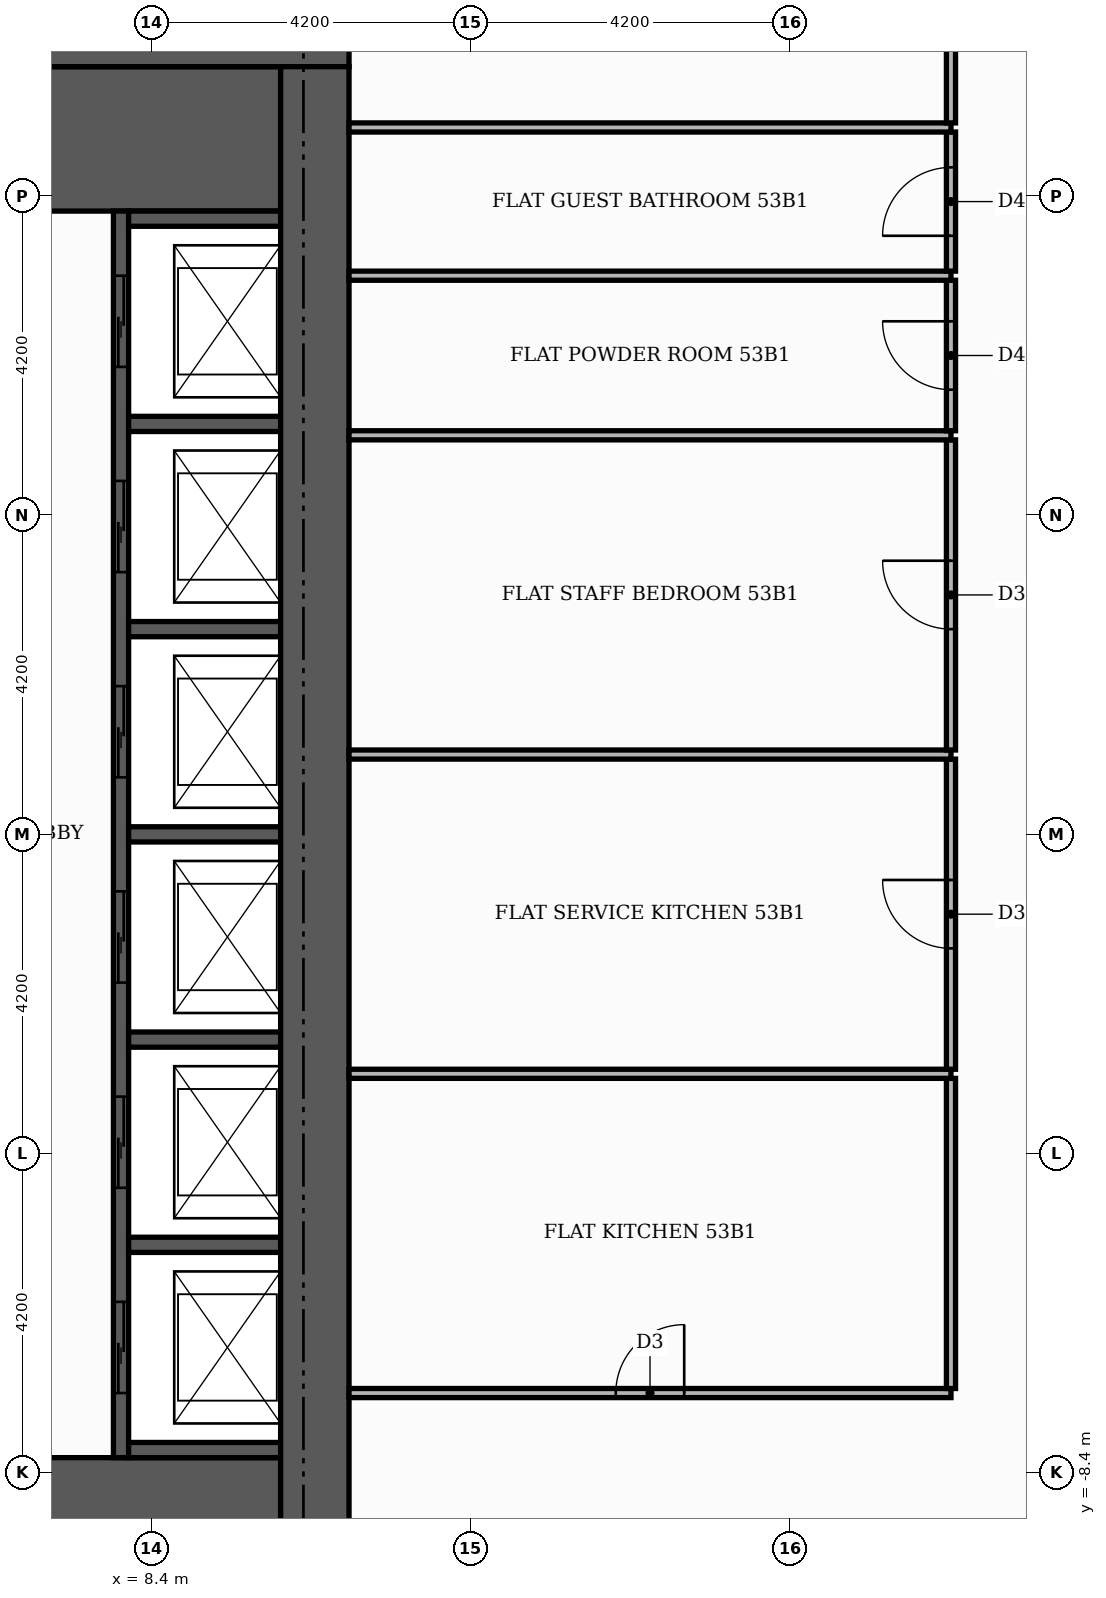
"""IFC4 building model, lengths in metres.
Left out: names, types, materials, properties, quantities, classifications, styles, units other than length and angle.
Written with IfcOpenShell. Run it as: python <this file> out.ifc"""

import sys

from ifc_helpers import new_model, si_unit, direction, frame, frame_2d, origin, place, context, subcontext, project, spatial, rectangle, extrude, element, fill, save


model = new_model("IFC4")
c1 = context("Model", 3, precision=1e-05, world=origin(), true_north=direction((0.0, 1.0)))
c2 = subcontext(c1, "Body", "Model", "MODEL_VIEW")
j1 = project(units=[si_unit("LENGTHUNIT", "METRE"), si_unit("PLANEANGLEUNIT", "RADIAN")], contexts=[c1])
p1 = place(None, origin())
s1 = spatial("IfcSite", under=j1, at=p1, CompositionType="ELEMENT")
p2 = place(p1, origin())
s2 = spatial("IfcBuilding", under=s1, at=p2, CompositionType="ELEMENT")
p3 = place(p2, frame((0.0, 0.0, 223.5)))
s3 = spatial("IfcBuildingStorey", under=s2, at=p3, CompositionType="ELEMENT", Elevation=223.5)
for number, where, z_axis, x_axis in (
    (1, (5.5, -9.15, 0.0), (0.0, 0.0, 1.0), (1.0, 0.0, 0.0)),
    (2, (5.5, 9.15, 0.0), (0.0, 0.0, 1.0), (1.0, 0.0, 0.0)),
):
    element("IfcWall", number, at=place(p3, frame(where, z_axis=z_axis, x_axis=x_axis)), inside=s3, PredefinedType="SHEAR", context=c2, shape_type="SweptSolid", body=[
        extrude(rectangle(XDim=4.6, YDim=1.9, at=frame_2d((2.3, 0.0))), origin(), (0.0, 0.0, 1.0), 3.48),
    ])
p4 = place(p3, frame((8.0, -8.2, 0.0), z_axis=(0.0, 0.0, 1.0), x_axis=(0.0, 1.0, 0.0)))
e3 = element("IfcWall", 3, at=p4, inside=s3, PredefinedType="SHEAR", context=c2, shape_type="SweptSolid", body=[
    extrude(rectangle(XDim=16.4, YDim=0.2, at=frame_2d((8.2, 0.0))), origin(), (0.0, 0.0, 1.0), 3.48),
])
p5 = place(p4, frame((0.85, 0.0, 0.0)))
e4 = element("IfcOpeningElement", 4, at=p5, cuts=e3, PredefinedType="OPENING", context=c2, shape_type="SweptSolid", body=[
    extrude(rectangle(XDim=1.2, YDim=2.1, at=frame_2d((0.6, 1.05))), frame((0.0, 0.11, 0.0), z_axis=(0.0, -1.0, 0.0), x_axis=(1.0, 0.0, 0.0)), (0.0, 0.0, 1.0), 0.22),
])
p6 = place(p4, frame((3.55, 0.0, 0.0)))
e5 = element("IfcOpeningElement", 5, at=p6, cuts=e3, PredefinedType="OPENING", context=c2, shape_type="SweptSolid", body=[
    extrude(rectangle(XDim=1.2, YDim=2.1, at=frame_2d((0.6, 1.05))), frame((0.0, 0.11, 0.0), z_axis=(0.0, -1.0, 0.0), x_axis=(1.0, 0.0, 0.0)), (0.0, 0.0, 1.0), 0.22),
])
p7 = place(p4, frame((6.25, 0.0, 0.0)))
e6 = element("IfcOpeningElement", 6, at=p7, cuts=e3, PredefinedType="OPENING", context=c2, shape_type="SweptSolid", body=[
    extrude(rectangle(XDim=1.2, YDim=2.1, at=frame_2d((0.6, 1.05))), frame((0.0, 0.11, 0.0), z_axis=(0.0, -1.0, 0.0), x_axis=(1.0, 0.0, 0.0)), (0.0, 0.0, 1.0), 0.22),
])
p8 = place(p4, frame((8.95, 0.0, 0.0)))
e7 = element("IfcOpeningElement", 7, at=p8, cuts=e3, PredefinedType="OPENING", context=c2, shape_type="SweptSolid", body=[
    extrude(rectangle(XDim=1.2, YDim=2.1, at=frame_2d((0.6, 1.05))), frame((0.0, 0.11, 0.0), z_axis=(0.0, -1.0, 0.0), x_axis=(1.0, 0.0, 0.0)), (0.0, 0.0, 1.0), 0.22),
])
p9 = place(p4, frame((11.65, 0.0, 0.0)))
e8 = element("IfcOpeningElement", 8, at=p9, cuts=e3, PredefinedType="OPENING", context=c2, shape_type="SweptSolid", body=[
    extrude(rectangle(XDim=1.2, YDim=2.1, at=frame_2d((0.6, 1.05))), frame((0.0, 0.11, 0.0), z_axis=(0.0, -1.0, 0.0), x_axis=(1.0, 0.0, 0.0)), (0.0, 0.0, 1.0), 0.22),
])
p10 = place(p4, frame((14.35, 0.0, 0.0)))
e9 = element("IfcOpeningElement", 9, at=p10, cuts=e3, PredefinedType="OPENING", context=c2, shape_type="SweptSolid", body=[
    extrude(rectangle(XDim=1.2, YDim=2.1, at=frame_2d((0.6, 1.05))), frame((0.0, 0.11, 0.0), z_axis=(0.0, -1.0, 0.0), x_axis=(1.0, 0.0, 0.0)), (0.0, 0.0, 1.0), 0.22),
])
for number, where, z_axis, x_axis in (
    (10, (8.1, -8.1, 0.0), (0.0, 0.0, 1.0), (1.0, 0.0, 0.0)),
    (11, (8.1, -5.4, 0.0), (0.0, 0.0, 1.0), (1.0, 0.0, 0.0)),
    (12, (8.1, -2.7, 0.0), (0.0, 0.0, 1.0), (1.0, 0.0, 0.0)),
    (13, (8.1, 0.0, 0.0), (0.0, 0.0, 1.0), (1.0, 0.0, 0.0)),
    (14, (8.1, 2.7, 0.0), (0.0, 0.0, 1.0), (1.0, 0.0, 0.0)),
    (15, (8.1, 5.4, 0.0), (0.0, 0.0, 1.0), (1.0, 0.0, 0.0)),
    (16, (8.1, 8.1, 0.0), (0.0, 0.0, 1.0), (1.0, 0.0, 0.0)),
):
    element("IfcWall", number, at=place(p3, frame(where, z_axis=z_axis, x_axis=x_axis)), inside=s3, PredefinedType="SHEAR", context=c2, shape_type="SweptSolid", body=[
        extrude(rectangle(XDim=2.0, YDim=0.2, at=frame_2d((1.0, 0.0))), origin(), (0.0, 0.0, 1.0), 3.48),
    ])
p11 = place(p3, frame((-11.0, 10.55, 0.0), z_axis=(0.0, 0.0, 1.0), x_axis=(1.0, 0.0, 0.0)))
e17 = element("IfcWall", 17, at=p11, inside=s3, PredefinedType="SHEAR", context=c2, shape_type="SweptSolid", body=[
    extrude(rectangle(XDim=22.0, YDim=0.9, at=frame_2d((11.0, 0.0))), origin(), (0.0, 0.0, 1.0), 3.48),
])
p12 = place(p11, frame((13.3, 0.0, 0.0)))
e18 = element("IfcOpeningElement", 18, at=p12, cuts=e17, PredefinedType="OPENING", context=c2, shape_type="SweptSolid", body=[
    extrude(rectangle(XDim=1.8, YDim=2.2, at=frame_2d((0.9, 1.1))), frame((0.0, 0.46, 0.0), z_axis=(0.0, -1.0, 0.0), x_axis=(1.0, 0.0, 0.0)), (0.0, 0.0, 1.0), 0.92),
])
p13 = place(p3, frame((10.55, -10.1, 0.0), z_axis=(0.0, 0.0, 1.0), x_axis=(0.0, 1.0, 0.0)))
e19 = element("IfcWall", 19, at=p13, inside=s3, PredefinedType="SHEAR", context=c2, shape_type="SweptSolid", body=[
    extrude(rectangle(XDim=20.2, YDim=0.9, at=frame_2d((10.1, 0.0))), origin(), (0.0, 0.0, 1.0), 3.48),
])
p14 = place(p3, frame((11.0, -7.35, 0.0), z_axis=(0.0, 0.0, 1.0), x_axis=(1.0, 0.0, 0.0)))
e20 = element("IfcWall", 20, at=p14, inside=s3, PredefinedType="PARTITIONING", context=c2, shape_type="SweptSolid", body=[
    extrude(rectangle(XDim=7.92, YDim=0.12, at=frame_2d((3.96, 0.0))), origin(), (0.0, 0.0, 1.0), 3.48),
])
p15 = place(p14, frame((3.51, 0.0, 0.0)))
e21 = element("IfcOpeningElement", 21, at=p15, cuts=e20, PredefinedType="OPENING", context=c2, shape_type="SweptSolid", body=[
    extrude(rectangle(XDim=0.9, YDim=2.1, at=frame_2d((0.45, 1.05))), frame((0.0, 0.07, 0.0), z_axis=(0.0, -1.0, 0.0), x_axis=(1.0, 0.0, 0.0)), (0.0, 0.0, 1.0), 0.14),
])
p16 = place(p3, frame((18.92, -7.29, 0.0), z_axis=(0.0, 0.0, 1.0), x_axis=(0.0, 1.0, 0.0)))
e22 = element("IfcWall", 22, at=p16, inside=s3, PredefinedType="PARTITIONING", context=c2, shape_type="SweptSolid", body=[
    extrude(rectangle(XDim=4.08, YDim=0.12, at=frame_2d((2.04, 0.0))), origin(), (0.0, 0.0, 1.0), 3.48),
])
p17 = place(p3, frame((11.0, -3.15, 0.0), z_axis=(0.0, 0.0, 1.0), x_axis=(1.0, 0.0, 0.0)))
e23 = element("IfcWall", 23, at=p17, inside=s3, PredefinedType="PARTITIONING", context=c2, shape_type="SweptSolid", body=[
    extrude(rectangle(XDim=7.92, YDim=0.12, at=frame_2d((3.96, 0.0))), origin(), (0.0, 0.0, 1.0), 3.48),
])
p18 = place(p3, frame((18.92, -3.09, 0.0), z_axis=(0.0, 0.0, 1.0), x_axis=(0.0, 1.0, 0.0)))
e24 = element("IfcWall", 24, at=p18, inside=s3, PredefinedType="PARTITIONING", context=c2, shape_type="SweptSolid", body=[
    extrude(rectangle(XDim=4.08, YDim=0.12, at=frame_2d((2.04, 0.0))), origin(), (0.0, 0.0, 1.0), 3.48),
])
p19 = place(p18, frame((1.59, 0.0, 0.0)))
e25 = element("IfcOpeningElement", 25, at=p19, cuts=e24, PredefinedType="OPENING", context=c2, shape_type="SweptSolid", body=[
    extrude(rectangle(XDim=0.9, YDim=2.1, at=frame_2d((0.45, 1.05))), frame((0.0, 0.07, 0.0), z_axis=(0.0, -1.0, 0.0), x_axis=(1.0, 0.0, 0.0)), (0.0, 0.0, 1.0), 0.14),
])
p20 = place(p3, frame((11.0, 1.05, 0.0), z_axis=(0.0, 0.0, 1.0), x_axis=(1.0, 0.0, 0.0)))
e26 = element("IfcWall", 26, at=p20, inside=s3, PredefinedType="PARTITIONING", context=c2, shape_type="SweptSolid", body=[
    extrude(rectangle(XDim=7.92, YDim=0.12, at=frame_2d((3.96, 0.0))), origin(), (0.0, 0.0, 1.0), 3.48),
])
p21 = place(p3, frame((18.92, 1.11, 0.0), z_axis=(0.0, 0.0, 1.0), x_axis=(0.0, 1.0, 0.0)))
e27 = element("IfcWall", 27, at=p21, inside=s3, PredefinedType="PARTITIONING", context=c2, shape_type="SweptSolid", body=[
    extrude(rectangle(XDim=4.08, YDim=0.12, at=frame_2d((2.04, 0.0))), origin(), (0.0, 0.0, 1.0), 3.48),
])
p22 = place(p21, frame((1.59, 0.0, 0.0)))
e28 = element("IfcOpeningElement", 28, at=p22, cuts=e27, PredefinedType="OPENING", context=c2, shape_type="SweptSolid", body=[
    extrude(rectangle(XDim=0.9, YDim=2.1, at=frame_2d((0.45, 1.05))), frame((0.0, 0.07, 0.0), z_axis=(0.0, -1.0, 0.0), x_axis=(1.0, 0.0, 0.0)), (0.0, 0.0, 1.0), 0.14),
])
p23 = place(p3, frame((11.0, 5.25, 0.0), z_axis=(0.0, 0.0, 1.0), x_axis=(1.0, 0.0, 0.0)))
e29 = element("IfcWall", 29, at=p23, inside=s3, PredefinedType="PARTITIONING", context=c2, shape_type="SweptSolid", body=[
    extrude(rectangle(XDim=7.92, YDim=0.12, at=frame_2d((3.96, 0.0))), origin(), (0.0, 0.0, 1.0), 3.48),
])
p24 = place(p3, frame((18.92, 5.31, 0.0), z_axis=(0.0, 0.0, 1.0), x_axis=(0.0, 1.0, 0.0)))
e30 = element("IfcWall", 30, at=p24, inside=s3, PredefinedType="PARTITIONING", context=c2, shape_type="SweptSolid", body=[
    extrude(rectangle(XDim=1.98, YDim=0.12, at=frame_2d((0.99, 0.0))), origin(), (0.0, 0.0, 1.0), 3.48),
])
p25 = place(p24, frame((0.54, 0.0, 0.0)))
e31 = element("IfcOpeningElement", 31, at=p25, cuts=e30, PredefinedType="OPENING", context=c2, shape_type="SweptSolid", body=[
    extrude(rectangle(XDim=0.9, YDim=2.1, at=frame_2d((0.45, 1.05))), frame((0.0, 0.07, 0.0), z_axis=(0.0, -1.0, 0.0), x_axis=(1.0, 0.0, 0.0)), (0.0, 0.0, 1.0), 0.14),
])
p26 = place(p3, frame((11.0, 7.35, 0.0), z_axis=(0.0, 0.0, 1.0), x_axis=(1.0, 0.0, 0.0)))
e32 = element("IfcWall", 32, at=p26, inside=s3, PredefinedType="PARTITIONING", context=c2, shape_type="SweptSolid", body=[
    extrude(rectangle(XDim=7.92, YDim=0.12, at=frame_2d((3.96, 0.0))), origin(), (0.0, 0.0, 1.0), 3.48),
])
p27 = place(p3, frame((18.92, 7.41, 0.0), z_axis=(0.0, 0.0, 1.0), x_axis=(0.0, 1.0, 0.0)))
e33 = element("IfcWall", 33, at=p27, inside=s3, PredefinedType="PARTITIONING", context=c2, shape_type="SweptSolid", body=[
    extrude(rectangle(XDim=1.83, YDim=0.12, at=frame_2d((0.915, 0.0))), origin(), (0.0, 0.0, 1.0), 3.48),
])
p28 = place(p27, frame((0.465, 0.0, 0.0)))
e34 = element("IfcOpeningElement", 34, at=p28, cuts=e33, PredefinedType="OPENING", context=c2, shape_type="SweptSolid", body=[
    extrude(rectangle(XDim=0.9, YDim=2.1, at=frame_2d((0.45, 1.05))), frame((0.0, 0.07, 0.0), z_axis=(0.0, -1.0, 0.0), x_axis=(1.0, 0.0, 0.0)), (0.0, 0.0, 1.0), 0.14),
])
p29 = place(p3, frame((11.0, 9.3, 0.0), z_axis=(0.0, 0.0, 1.0), x_axis=(1.0, 0.0, 0.0)))
e35 = element("IfcWall", 35, at=p29, inside=s3, PredefinedType="PARTITIONING", context=c2, shape_type="SweptSolid", body=[
    extrude(rectangle(XDim=7.92, YDim=0.12, at=frame_2d((3.96, 0.0))), origin(), (0.0, 0.0, 1.0), 3.48),
])
p30 = place(p3, frame((18.92, 9.36, 0.0), z_axis=(0.0, 0.0, 1.0), x_axis=(0.0, 1.0, 0.0)))
e36 = element("IfcWall", 36, at=p30, inside=s3, PredefinedType="PARTITIONING", context=c2, shape_type="SweptSolid", body=[
    extrude(rectangle(XDim=4.19, YDim=0.12, at=frame_2d((2.095, 0.0))), origin(), (0.0, 0.0, 1.0), 3.48),
])
p31 = place(p30, frame((1.665, 0.0, 0.0)))
e37 = element("IfcOpeningElement", 37, at=p31, cuts=e36, PredefinedType="OPENING", context=c2, shape_type="SweptSolid", body=[
    extrude(rectangle(XDim=0.9, YDim=2.1, at=frame_2d((0.45, 1.05))), frame((0.0, 0.07, 0.0), z_axis=(0.0, -1.0, 0.0), x_axis=(1.0, 0.0, 0.0)), (0.0, 0.0, 1.0), 0.14),
])
p32 = place(p5, origin())
e38 = element("IfcDoor", 38, at=p32, inside=s3, OperationType="SLIDING_TO_LEFT", PredefinedType="DOOR", context=c2, shape_type="SweptSolid", body=[
    extrude(rectangle(XDim=1.2, YDim=2.1, at=frame_2d((0.6, 1.05))), frame((0.0, 0.025, 0.0), z_axis=(0.0, -1.0, 0.0), x_axis=(1.0, 0.0, 0.0)), (0.0, 0.0, 1.0), 0.05),
])
fill(e4, e38)
p33 = place(p6, origin())
e39 = element("IfcDoor", 39, at=p33, inside=s3, OperationType="SLIDING_TO_LEFT", PredefinedType="DOOR", context=c2, shape_type="SweptSolid", body=[
    extrude(rectangle(XDim=1.2, YDim=2.1, at=frame_2d((0.6, 1.05))), frame((0.0, 0.025, 0.0), z_axis=(0.0, -1.0, 0.0), x_axis=(1.0, 0.0, 0.0)), (0.0, 0.0, 1.0), 0.05),
])
fill(e5, e39)
p34 = place(p7, origin())
e40 = element("IfcDoor", 40, at=p34, inside=s3, OperationType="SLIDING_TO_LEFT", PredefinedType="DOOR", context=c2, shape_type="SweptSolid", body=[
    extrude(rectangle(XDim=1.2, YDim=2.1, at=frame_2d((0.6, 1.05))), frame((0.0, 0.025, 0.0), z_axis=(0.0, -1.0, 0.0), x_axis=(1.0, 0.0, 0.0)), (0.0, 0.0, 1.0), 0.05),
])
fill(e6, e40)
p35 = place(p8, origin())
e41 = element("IfcDoor", 41, at=p35, inside=s3, OperationType="SLIDING_TO_LEFT", PredefinedType="DOOR", context=c2, shape_type="SweptSolid", body=[
    extrude(rectangle(XDim=1.2, YDim=2.1, at=frame_2d((0.6, 1.05))), frame((0.0, 0.025, 0.0), z_axis=(0.0, -1.0, 0.0), x_axis=(1.0, 0.0, 0.0)), (0.0, 0.0, 1.0), 0.05),
])
fill(e7, e41)
p36 = place(p9, origin())
e42 = element("IfcDoor", 42, at=p36, inside=s3, OperationType="SLIDING_TO_LEFT", PredefinedType="DOOR", context=c2, shape_type="SweptSolid", body=[
    extrude(rectangle(XDim=1.2, YDim=2.1, at=frame_2d((0.6, 1.05))), frame((0.0, 0.025, 0.0), z_axis=(0.0, -1.0, 0.0), x_axis=(1.0, 0.0, 0.0)), (0.0, 0.0, 1.0), 0.05),
])
fill(e8, e42)
p37 = place(p10, origin())
e43 = element("IfcDoor", 43, at=p37, inside=s3, OperationType="SLIDING_TO_LEFT", PredefinedType="DOOR", context=c2, shape_type="SweptSolid", body=[
    extrude(rectangle(XDim=1.2, YDim=2.1, at=frame_2d((0.6, 1.05))), frame((0.0, 0.025, 0.0), z_axis=(0.0, -1.0, 0.0), x_axis=(1.0, 0.0, 0.0)), (0.0, 0.0, 1.0), 0.05),
])
fill(e9, e43)
p38 = place(p15, origin())
e44 = element("IfcDoor", 44, at=p38, inside=s3, OperationType="SINGLE_SWING_RIGHT", PredefinedType="DOOR", context=c2, shape_type="SweptSolid", body=[
    extrude(rectangle(XDim=0.9, YDim=2.1, at=frame_2d((0.45, 1.05))), frame((0.0, 0.025, 0.0), z_axis=(0.0, -1.0, 0.0), x_axis=(1.0, 0.0, 0.0)), (0.0, 0.0, 1.0), 0.05),
])
fill(e21, e44)
p39 = place(p19, origin())
e45 = element("IfcDoor", 45, at=p39, inside=s3, OperationType="SINGLE_SWING_RIGHT", PredefinedType="DOOR", context=c2, shape_type="SweptSolid", body=[
    extrude(rectangle(XDim=0.9, YDim=2.1, at=frame_2d((0.45, 1.05))), frame((0.0, 0.025, 0.0), z_axis=(0.0, -1.0, 0.0), x_axis=(1.0, 0.0, 0.0)), (0.0, 0.0, 1.0), 0.05),
])
fill(e25, e45)
p40 = place(p22, origin())
e46 = element("IfcDoor", 46, at=p40, inside=s3, OperationType="SINGLE_SWING_RIGHT", PredefinedType="DOOR", context=c2, shape_type="SweptSolid", body=[
    extrude(rectangle(XDim=0.9, YDim=2.1, at=frame_2d((0.45, 1.05))), frame((0.0, 0.025, 0.0), z_axis=(0.0, -1.0, 0.0), x_axis=(1.0, 0.0, 0.0)), (0.0, 0.0, 1.0), 0.05),
])
fill(e28, e46)
p41 = place(p25, origin())
e47 = element("IfcDoor", 47, at=p41, inside=s3, OperationType="SINGLE_SWING_RIGHT", PredefinedType="DOOR", context=c2, shape_type="SweptSolid", body=[
    extrude(rectangle(XDim=0.9, YDim=2.1, at=frame_2d((0.45, 1.05))), frame((0.0, 0.025, 0.0), z_axis=(0.0, -1.0, 0.0), x_axis=(1.0, 0.0, 0.0)), (0.0, 0.0, 1.0), 0.05),
])
fill(e31, e47)
p42 = place(p28, origin())
e48 = element("IfcDoor", 48, at=p42, inside=s3, OperationType="SINGLE_SWING_LEFT", PredefinedType="DOOR", context=c2, shape_type="SweptSolid", body=[
    extrude(rectangle(XDim=0.9, YDim=2.1, at=frame_2d((0.45, 1.05))), frame((0.0, 0.025, 0.0), z_axis=(0.0, -1.0, 0.0), x_axis=(1.0, 0.0, 0.0)), (0.0, 0.0, 1.0), 0.05),
])
fill(e34, e48)
save(model, sys.argv[1])
